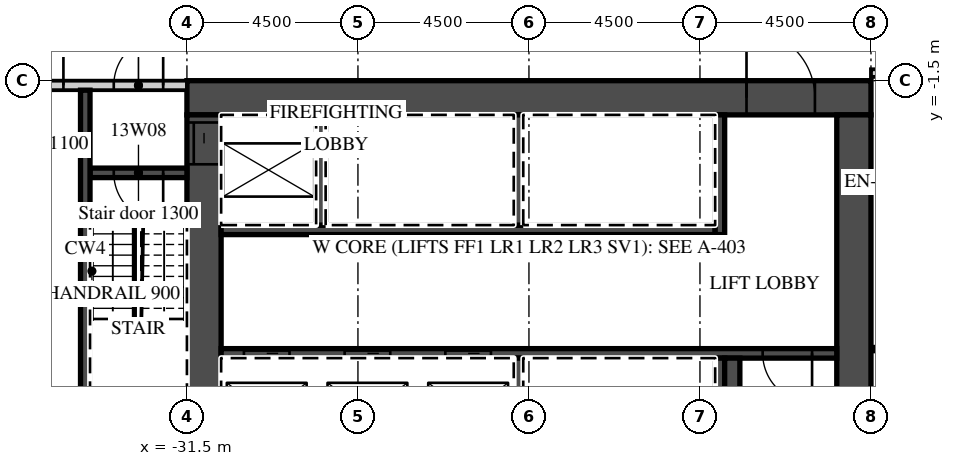
"""IFC4 building model, lengths in metres.
Left out: names, types, materials, properties, quantities, classifications, styles, units other than length and angle.
Written with IfcOpenShell. Run it as: python <this file> out.ifc"""

import sys

from ifc_helpers import new_model, si_unit, direction, frame, frame_2d, origin, place, context, subcontext, project, spatial, rectangle, extrude, element, fill, save


model = new_model("IFC4")
c1 = context("Model", 3, precision=1e-05, world=origin(), true_north=direction((0.0, 1.0)))
c2 = subcontext(c1, "Body", "Model", "MODEL_VIEW")
j1 = project(units=[si_unit("LENGTHUNIT", "METRE"), si_unit("PLANEANGLEUNIT", "RADIAN")], contexts=[c1])
p1 = place(None, origin())
s1 = spatial("IfcSite", under=j1, at=p1, CompositionType="ELEMENT")
p2 = place(p1, origin())
s2 = spatial("IfcBuilding", under=s1, at=p2, CompositionType="ELEMENT")
p3 = place(p2, frame((0.0, 0.0, 73.2)))
s3 = spatial("IfcBuildingStorey", under=s2, at=p3, CompositionType="ELEMENT", Elevation=73.2)
p4 = place(p3, frame((-13.5, -1.3, 0.0), z_axis=(0.0, 0.0, 1.0), x_axis=(1.0, 0.0, 0.0)))
e1 = element("IfcWall", 1, at=p4, inside=s3, PredefinedType="PARTITIONING", context=c2, shape_type="SweptSolid", body=[
    extrude(rectangle(XDim=58.05, YDim=0.2, at=frame_2d((29.025, 0.0))), origin(), (0.0, 0.0, 1.0), 3.02),
])
p5 = place(p4, frame((2.925, 0.0, 0.0)))
e2 = element("IfcOpeningElement", 2, at=p5, cuts=e1, PredefinedType="OPENING", context=c2, shape_type="SweptSolid", body=[
    extrude(rectangle(XDim=1.0, YDim=2.1, at=frame_2d((0.5, 1.05))), frame((0.0, 0.11, 0.0), z_axis=(0.0, -1.0, 0.0), x_axis=(1.0, 0.0, 0.0)), (0.0, 0.0, 1.0), 0.22),
])
p6 = place(p4, frame((5.075, 0.0, 0.0)))
e3 = element("IfcOpeningElement", 3, at=p6, cuts=e1, PredefinedType="OPENING", context=c2, shape_type="SweptSolid", body=[
    extrude(rectangle(XDim=1.0, YDim=2.1, at=frame_2d((0.5, 1.05))), frame((0.0, 0.11, 0.0), z_axis=(0.0, -1.0, 0.0), x_axis=(1.0, 0.0, 0.0)), (0.0, 0.0, 1.0), 0.22),
])
p7 = place(p4, frame((9.55, 0.0, 0.0)))
e4 = element("IfcOpeningElement", 4, at=p7, cuts=e1, PredefinedType="OPENING", context=c2, shape_type="SweptSolid", body=[
    extrude(rectangle(XDim=1.0, YDim=2.1, at=frame_2d((0.5, 1.05))), frame((0.0, 0.11, 0.0), z_axis=(0.0, -1.0, 0.0), x_axis=(1.0, 0.0, 0.0)), (0.0, 0.0, 1.0), 0.22),
])
p8 = place(p4, frame((18.862, 0.0, 0.0)))
e5 = element("IfcOpeningElement", 5, at=p8, cuts=e1, PredefinedType="OPENING", context=c2, shape_type="SweptSolid", body=[
    extrude(rectangle(XDim=1.2, YDim=2.1, at=frame_2d((0.6, 1.05))), frame((0.0, 0.11, 0.0), z_axis=(0.0, -1.0, 0.0), x_axis=(1.0, 0.0, 0.0)), (0.0, 0.0, 1.0), 0.22),
])
p9 = place(p4, frame((27.862, 0.0, 0.0)))
e6 = element("IfcOpeningElement", 6, at=p9, cuts=e1, PredefinedType="OPENING", context=c2, shape_type="SweptSolid", body=[
    extrude(rectangle(XDim=1.2, YDim=2.1, at=frame_2d((0.6, 1.05))), frame((0.0, 0.11, 0.0), z_axis=(0.0, -1.0, 0.0), x_axis=(1.0, 0.0, 0.0)), (0.0, 0.0, 1.0), 0.22),
])
p10 = place(p4, frame((34.45, 0.0, 0.0)))
e7 = element("IfcOpeningElement", 7, at=p10, cuts=e1, PredefinedType="OPENING", context=c2, shape_type="SweptSolid", body=[
    extrude(rectangle(XDim=1.0, YDim=2.1, at=frame_2d((0.5, 1.05))), frame((0.0, 0.11, 0.0), z_axis=(0.0, -1.0, 0.0), x_axis=(1.0, 0.0, 0.0)), (0.0, 0.0, 1.0), 0.22),
])
p11 = place(p4, frame((38.925, 0.0, 0.0)))
e8 = element("IfcOpeningElement", 8, at=p11, cuts=e1, PredefinedType="OPENING", context=c2, shape_type="SweptSolid", body=[
    extrude(rectangle(XDim=1.0, YDim=2.1, at=frame_2d((0.5, 1.05))), frame((0.0, 0.11, 0.0), z_axis=(0.0, -1.0, 0.0), x_axis=(1.0, 0.0, 0.0)), (0.0, 0.0, 1.0), 0.22),
])
p12 = place(p4, frame((45.862, 0.0, 0.0)))
e9 = element("IfcOpeningElement", 9, at=p12, cuts=e1, PredefinedType="OPENING", context=c2, shape_type="SweptSolid", body=[
    extrude(rectangle(XDim=1.2, YDim=2.1, at=frame_2d((0.6, 1.05))), frame((0.0, 0.11, 0.0), z_axis=(0.0, -1.0, 0.0), x_axis=(1.0, 0.0, 0.0)), (0.0, 0.0, 1.0), 0.22),
])
p13 = place(p4, frame((50.075, 0.0, 0.0)))
e10 = element("IfcOpeningElement", 10, at=p13, cuts=e1, PredefinedType="OPENING", context=c2, shape_type="SweptSolid", body=[
    extrude(rectangle(XDim=1.0, YDim=2.1, at=frame_2d((0.5, 1.05))), frame((0.0, 0.11, 0.0), z_axis=(0.0, -1.0, 0.0), x_axis=(1.0, 0.0, 0.0)), (0.0, 0.0, 1.0), 0.22),
])
p14 = place(p4, frame((56.525, 0.0, 0.0)))
e11 = element("IfcOpeningElement", 11, at=p14, cuts=e1, PredefinedType="OPENING", context=c2, shape_type="SweptSolid", body=[
    extrude(rectangle(XDim=1.0, YDim=2.1, at=frame_2d((0.5, 1.05))), frame((0.0, 0.11, 0.0), z_axis=(0.0, -1.0, 0.0), x_axis=(1.0, 0.0, 0.0)), (0.0, 0.0, 1.0), 0.22),
])
p15 = place(p3, frame((-31.5, -1.95, 0.0), z_axis=(0.0, 0.0, 1.0), x_axis=(1.0, 0.0, 0.0)))
e12 = element("IfcWall", 12, at=p15, inside=s3, PredefinedType="SHEAR", context=c2, shape_type="SweptSolid", body=[
    extrude(rectangle(XDim=18.0, YDim=0.9, at=frame_2d((9.0, 0.0))), origin(), (0.0, 0.0, 1.0), 3.02),
])
p16 = place(p15, frame((14.725, 0.0, 0.0)))
e13 = element("IfcOpeningElement", 13, at=p16, cuts=e12, PredefinedType="OPENING", context=c2, shape_type="SweptSolid", body=[
    extrude(rectangle(XDim=1.8, YDim=2.1, at=frame_2d((0.9, 1.05))), frame((0.0, 0.46, 0.0), z_axis=(0.0, -1.0, 0.0), x_axis=(1.0, 0.0, 0.0)), (0.0, 0.0, 1.0), 0.92),
])
p17 = place(p3, frame((-31.05, -15.2, 0.0), z_axis=(0.0, 0.0, 1.0), x_axis=(0.0, 1.0, 0.0)))
e14 = element("IfcWall", 14, at=p17, inside=s3, PredefinedType="SHEAR", context=c2, shape_type="SweptSolid", body=[
    extrude(rectangle(XDim=12.8, YDim=0.9, at=frame_2d((6.4, 0.0))), origin(), (0.0, 0.0, 1.0), 3.02),
])
p18 = place(p17, frame((11.5, 0.0, 0.0)))
e15 = element("IfcOpeningElement", 15, at=p18, cuts=e14, PredefinedType="OPENING", context=c2, shape_type="SweptSolid", body=[
    extrude(rectangle(XDim=1.1, YDim=2.1, at=frame_2d((0.55, 1.05))), frame((0.0, 0.46, 0.0), z_axis=(0.0, -1.0, 0.0), x_axis=(1.0, 0.0, 0.0)), (0.0, 0.0, 1.0), 0.92),
])
p19 = place(p3, frame((-13.95, -14.6, 0.0), z_axis=(0.0, 0.0, 1.0), x_axis=(0.0, 1.0, 0.0)))
e16 = element("IfcWall", 16, at=p19, inside=s3, PredefinedType="SHEAR", context=c2, shape_type="SweptSolid", body=[
    extrude(rectangle(XDim=12.2, YDim=0.9, at=frame_2d((6.1, 0.0))), origin(), (0.0, 0.0, 1.0), 3.02),
])
p20 = place(p3, frame((-30.6, -5.425, 0.0), z_axis=(0.0, 0.0, 1.0), x_axis=(1.0, 0.0, 0.0)))
e17 = element("IfcWall", 17, at=p20, inside=s3, PredefinedType="SHEAR", context=c2, shape_type="SweptSolid", body=[
    extrude(rectangle(XDim=13.0, YDim=0.25, at=frame_2d((6.5, 0.0))), origin(), (0.0, 0.0, 1.0), 3.02),
])
p21 = place(p3, frame((-17.475, -5.55, 0.0), z_axis=(0.0, 0.0, 1.0), x_axis=(0.0, 1.0, 0.0)))
e18 = element("IfcWall", 18, at=p21, inside=s3, PredefinedType="SHEAR", context=c2, shape_type="SweptSolid", body=[
    extrude(rectangle(XDim=3.15, YDim=0.25, at=frame_2d((1.575, 0.0))), origin(), (0.0, 0.0, 1.0), 3.02),
])
for number, where, z_axis, x_axis in (
    (19, (-27.975, -5.3, 0.0), (0.0, 0.0, 1.0), (0.0, 1.0, 0.0)),
    (20, (-22.775, -5.3, 0.0), (0.0, 0.0, 1.0), (0.0, 1.0, 0.0)),
):
    element("IfcWall", number, at=place(p3, frame(where, z_axis=z_axis, x_axis=x_axis)), inside=s3, PredefinedType="SHEAR", context=c2, shape_type="SweptSolid", body=[
        extrude(rectangle(XDim=2.9, YDim=0.25, at=frame_2d((1.45, 0.0))), origin(), (0.0, 0.0, 1.0), 3.02),
    ])
p22 = place(p3, frame((-30.6, -8.675, 0.0), z_axis=(0.0, 0.0, 1.0), x_axis=(1.0, 0.0, 0.0)))
e21 = element("IfcWall", 21, at=p22, inside=s3, PredefinedType="SHEAR", context=c2, shape_type="SweptSolid", body=[
    extrude(rectangle(XDim=16.2, YDim=0.25, at=frame_2d((8.1, 0.0))), origin(), (0.0, 0.0, 1.0), 3.02),
])
p23 = place(p22, frame((0.6, 0.0, 0.0)))
e22 = element("IfcOpeningElement", 22, at=p23, cuts=e21, PredefinedType="OPENING", context=c2, shape_type="SweptSolid", body=[
    extrude(rectangle(XDim=1.2, YDim=2.1, at=frame_2d((0.6, 1.05))), frame((0.0, 0.135, 0.0), z_axis=(0.0, -1.0, 0.0), x_axis=(1.0, 0.0, 0.0)), (0.0, 0.0, 1.0), 0.27),
])
p24 = place(p22, frame((3.25, 0.0, 0.0)))
e23 = element("IfcOpeningElement", 23, at=p24, cuts=e21, PredefinedType="OPENING", context=c2, shape_type="SweptSolid", body=[
    extrude(rectangle(XDim=1.2, YDim=2.1, at=frame_2d((0.6, 1.05))), frame((0.0, 0.135, 0.0), z_axis=(0.0, -1.0, 0.0), x_axis=(1.0, 0.0, 0.0)), (0.0, 0.0, 1.0), 0.27),
])
p25 = place(p22, frame((5.9, 0.0, 0.0)))
e24 = element("IfcOpeningElement", 24, at=p25, cuts=e21, PredefinedType="OPENING", context=c2, shape_type="SweptSolid", body=[
    extrude(rectangle(XDim=1.2, YDim=2.1, at=frame_2d((0.6, 1.05))), frame((0.0, 0.135, 0.0), z_axis=(0.0, -1.0, 0.0), x_axis=(1.0, 0.0, 0.0)), (0.0, 0.0, 1.0), 0.27),
])
p26 = place(p22, frame((14.25, 0.0, 0.0)))
e25 = element("IfcOpeningElement", 25, at=p26, cuts=e21, PredefinedType="OPENING", context=c2, shape_type="SweptSolid", body=[
    extrude(rectangle(XDim=1.3, YDim=2.1, at=frame_2d((0.65, 1.05))), frame((0.0, 0.135, 0.0), z_axis=(0.0, -1.0, 0.0), x_axis=(1.0, 0.0, 0.0)), (0.0, 0.0, 1.0), 0.27),
])
for number, where, z_axis, x_axis in (
    (26, (-17.475, -11.7, 0.0), (0.0, 0.0, 1.0), (0.0, 1.0, 0.0)),
    (27, (-22.775, -11.7, 0.0), (0.0, 0.0, 1.0), (0.0, 1.0, 0.0)),
):
    element("IfcWall", number, at=place(p3, frame(where, z_axis=z_axis, x_axis=x_axis)), inside=s3, PredefinedType="SHEAR", context=c2, shape_type="SweptSolid", body=[
        extrude(rectangle(XDim=2.9, YDim=0.25, at=frame_2d((1.45, 0.0))), origin(), (0.0, 0.0, 1.0), 3.02),
    ])
p27 = place(p3, frame((-17.15, -14.6, 0.0), z_axis=(0.0, 0.0, 1.0), x_axis=(0.0, 1.0, 0.0)))
e28 = element("IfcWall", 28, at=p27, inside=s3, PredefinedType="SHEAR", context=c2, shape_type="SweptSolid", body=[
    extrude(rectangle(XDim=5.8, YDim=0.4, at=frame_2d((2.9, 0.0))), origin(), (0.0, 0.0, 1.0), 3.02),
])
p28 = place(p3, frame((-44.55, -1.625, 0.0), z_axis=(0.0, 0.0, 1.0), x_axis=(1.0, 0.0, 0.0)))
e29 = element("IfcWall", 29, at=p28, inside=s3, PredefinedType="PARTITIONING", context=c2, shape_type="SweptSolid", body=[
    extrude(rectangle(XDim=13.05, YDim=0.25, at=frame_2d((6.525, 0.0))), origin(), (0.0, 0.0, 1.0), 3.02),
])
p29 = place(p28, frame((11.125, 0.0, 0.0)))
e30 = element("IfcOpeningElement", 30, at=p29, cuts=e29, PredefinedType="OPENING", context=c2, shape_type="SweptSolid", body=[
    extrude(rectangle(XDim=1.3, YDim=2.1, at=frame_2d((0.65, 1.05))), frame((0.0, 0.135, 0.0), z_axis=(0.0, -1.0, 0.0), x_axis=(1.0, 0.0, 0.0)), (0.0, 0.0, 1.0), 0.27),
])
p30 = place(p28, frame((8.7, 0.0, 0.0)))
e31 = element("IfcOpeningElement", 31, at=p30, cuts=e29, PredefinedType="OPENING", context=c2, shape_type="SweptSolid", body=[
    extrude(rectangle(XDim=1.1, YDim=2.1, at=frame_2d((0.55, 1.05))), frame((0.0, 0.135, 0.0), z_axis=(0.0, -1.0, 0.0), x_axis=(1.0, 0.0, 0.0)), (0.0, 0.0, 1.0), 0.27),
])
p31 = place(p3, frame((-34.05, -3.925, 0.0), z_axis=(0.0, 0.0, 1.0), x_axis=(1.0, 0.0, 0.0)))
e32 = element("IfcWall", 32, at=p31, inside=s3, PredefinedType="SHEAR", context=c2, shape_type="SweptSolid", body=[
    extrude(rectangle(XDim=2.55, YDim=0.25, at=frame_2d((1.275, 0.0))), origin(), (0.0, 0.0, 1.0), 3.02),
])
p32 = place(p31, frame((0.625, 0.0, 0.0)))
e33 = element("IfcOpeningElement", 33, at=p32, cuts=e32, PredefinedType="OPENING", context=c2, shape_type="SweptSolid", body=[
    extrude(rectangle(XDim=1.3, YDim=2.1, at=frame_2d((0.65, 1.05))), frame((0.0, 0.135, 0.0), z_axis=(0.0, -1.0, 0.0), x_axis=(1.0, 0.0, 0.0)), (0.0, 0.0, 1.0), 0.27),
])
p33 = place(p3, frame((-34.175, -10.1, 0.0), z_axis=(0.0, 0.0, 1.0), x_axis=(0.0, 1.0, 0.0)))
e34 = element("IfcWall", 34, at=p33, inside=s3, PredefinedType="SHEAR", context=c2, shape_type="SweptSolid", body=[
    extrude(rectangle(XDim=8.35, YDim=0.25, at=frame_2d((4.175, 0.0))), origin(), (0.0, 0.0, 1.0), 3.02),
])
p34 = place(p23, origin())
e35 = element("IfcDoor", 35, at=p34, inside=s3, OperationType="SLIDING_TO_LEFT", PredefinedType="DOOR", context=c2, shape_type="SweptSolid", body=[
    extrude(rectangle(XDim=1.2, YDim=2.1, at=frame_2d((0.6, 1.05))), frame((0.0, 0.025, 0.0), z_axis=(0.0, -1.0, 0.0), x_axis=(1.0, 0.0, 0.0)), (0.0, 0.0, 1.0), 0.05),
])
fill(e22, e35)
p35 = place(p24, origin())
e36 = element("IfcDoor", 36, at=p35, inside=s3, OperationType="SLIDING_TO_RIGHT", PredefinedType="DOOR", context=c2, shape_type="SweptSolid", body=[
    extrude(rectangle(XDim=1.2, YDim=2.1, at=frame_2d((0.6, 1.05))), frame((0.0, 0.025, 0.0), z_axis=(0.0, -1.0, 0.0), x_axis=(1.0, 0.0, 0.0)), (0.0, 0.0, 1.0), 0.05),
])
fill(e23, e36)
p36 = place(p25, origin())
e37 = element("IfcDoor", 37, at=p36, inside=s3, OperationType="SLIDING_TO_RIGHT", PredefinedType="DOOR", context=c2, shape_type="SweptSolid", body=[
    extrude(rectangle(XDim=1.2, YDim=2.1, at=frame_2d((0.6, 1.05))), frame((0.0, 0.025, 0.0), z_axis=(0.0, -1.0, 0.0), x_axis=(1.0, 0.0, 0.0)), (0.0, 0.0, 1.0), 0.05),
])
fill(e24, e37)
p37 = place(p18, origin())
e38 = element("IfcDoor", 38, at=p37, inside=s3, OperationType="SLIDING_TO_RIGHT", PredefinedType="DOOR", context=c2, shape_type="SweptSolid", body=[
    extrude(rectangle(XDim=1.1, YDim=2.1, at=frame_2d((0.55, 1.05))), frame((0.0, 0.025, 0.0), z_axis=(0.0, -1.0, 0.0), x_axis=(1.0, 0.0, 0.0)), (0.0, 0.0, 1.0), 0.05),
])
fill(e15, e38)
p38 = place(p16, origin())
e39 = element("IfcDoor", 39, at=p38, inside=s3, OperationType="DOUBLE_DOOR_DOUBLE_SWING", PredefinedType="DOOR", context=c2, shape_type="SweptSolid", body=[
    extrude(rectangle(XDim=1.8, YDim=2.1, at=frame_2d((0.9, 1.05))), frame((0.0, 0.025, 0.0), z_axis=(0.0, -1.0, 0.0), x_axis=(1.0, 0.0, 0.0)), (0.0, 0.0, 1.0), 0.05),
])
fill(e13, e39)
p39 = place(p29, origin())
e40 = element("IfcDoor", 40, at=p39, inside=s3, OperationType="SINGLE_SWING_RIGHT", PredefinedType="DOOR", context=c2, shape_type="SweptSolid", body=[
    extrude(rectangle(XDim=1.3, YDim=2.1, at=frame_2d((0.65, 1.05))), frame((0.0, 0.025, 0.0), z_axis=(0.0, -1.0, 0.0), x_axis=(1.0, 0.0, 0.0)), (0.0, 0.0, 1.0), 0.05),
])
fill(e30, e40)
p40 = place(p32, origin())
e41 = element("IfcDoor", 41, at=p40, inside=s3, OperationType="SINGLE_SWING_RIGHT", PredefinedType="DOOR", context=c2, shape_type="SweptSolid", body=[
    extrude(rectangle(XDim=1.3, YDim=2.1, at=frame_2d((0.65, 1.05))), frame((0.0, 0.025, 0.0), z_axis=(0.0, -1.0, 0.0), x_axis=(1.0, 0.0, 0.0)), (0.0, 0.0, 1.0), 0.05),
])
fill(e33, e41)
p41 = place(p30, origin())
e42 = element("IfcDoor", 42, at=p41, inside=s3, OperationType="SINGLE_SWING_RIGHT", PredefinedType="DOOR", context=c2, shape_type="SweptSolid", body=[
    extrude(rectangle(XDim=1.1, YDim=2.1, at=frame_2d((0.55, 1.05))), frame((0.0, 0.025, 0.0), z_axis=(0.0, -1.0, 0.0), x_axis=(1.0, 0.0, 0.0)), (0.0, 0.0, 1.0), 0.05),
])
fill(e31, e42)
p42 = place(p26, origin())
e43 = element("IfcDoor", 43, at=p42, inside=s3, OperationType="SINGLE_SWING_RIGHT", PredefinedType="DOOR", context=c2, shape_type="SweptSolid", body=[
    extrude(rectangle(XDim=1.3, YDim=2.1, at=frame_2d((0.65, 1.05))), frame((0.0, 0.025, 0.0), z_axis=(0.0, -1.0, 0.0), x_axis=(1.0, 0.0, 0.0)), (0.0, 0.0, 1.0), 0.05),
])
fill(e25, e43)
save(model, sys.argv[1])
